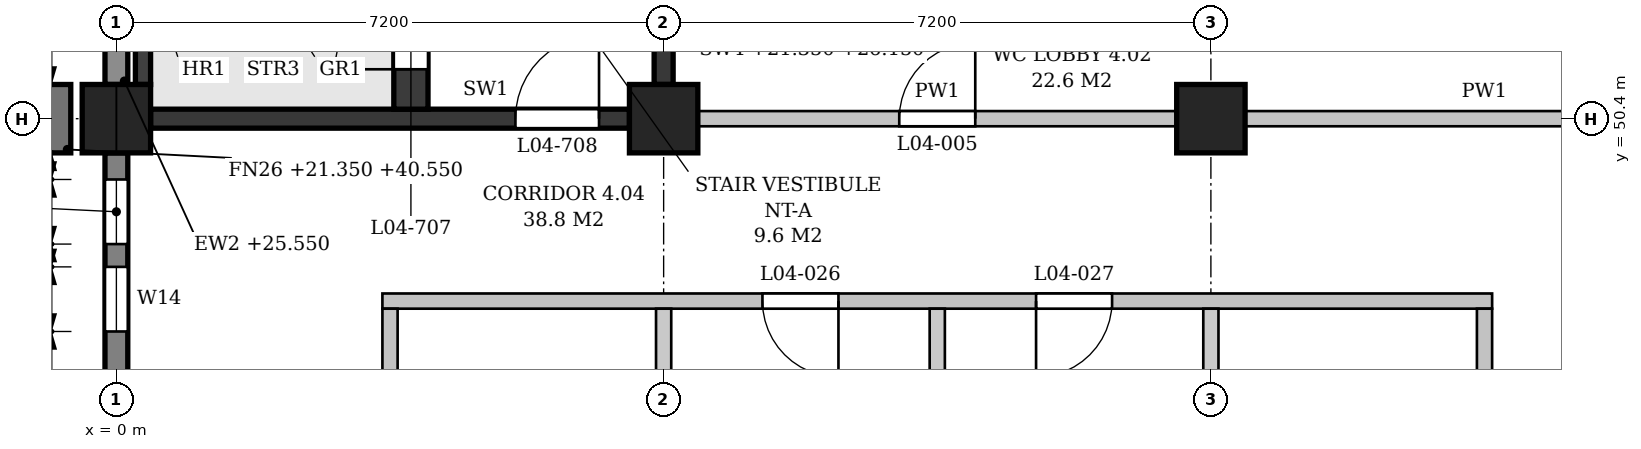
"""IFC4 building model, lengths in metres.
Left out: names, types, materials, properties, quantities, classifications, styles, units other than length and angle.
Written with IfcOpenShell. Run it as: python <this file> out.ifc"""

import sys

from ifc_helpers import new_model, si_unit, direction, frame, frame_2d, origin, origin_2d, place, context, subcontext, project, spatial, polyline, rectangle, outline, extrude, element, fill, save


model = new_model("IFC4")
c1 = context("Model", 3, precision=1e-05, world=origin(), true_north=direction((0.0, 1.0)))
c2 = subcontext(c1, "Body", "Model", "MODEL_VIEW")
j1 = project(units=[si_unit("LENGTHUNIT", "METRE"), si_unit("PLANEANGLEUNIT", "RADIAN")], contexts=[c1])
p1 = place(None, origin())
s1 = spatial("IfcSite", under=j1, at=p1, CompositionType="ELEMENT")
p2 = place(p1, origin())
s2 = spatial("IfcBuilding", under=s1, at=p2, CompositionType="ELEMENT")
p3 = place(p2, frame((0.0, 0.0, 21.6)))
s3 = spatial("IfcBuildingStorey", under=s2, at=p3, CompositionType="ELEMENT", Elevation=21.6)
for number, where, z_axis, x_axis in (
    (1, (0.0, 50.4, 0.0), (0.0, 0.0, 1.0), (1.0, 0.0, 0.0)),
    (2, (7.2, 50.4, 0.0), (0.0, 0.0, 1.0), (1.0, 0.0, 0.0)),
    (3, (14.4, 50.4, 0.0), (0.0, 0.0, 1.0), (1.0, 0.0, 0.0)),
):
    element("IfcColumn", number, at=place(p3, frame(where, z_axis=z_axis, x_axis=x_axis)), inside=s3, PredefinedType="COLUMN", context=c2, shape_type="SweptSolid", body=[
        extrude(rectangle(XDim=0.9, YDim=0.9, at=origin_2d()), origin(), (0.0, 0.0, 1.0), 4.8),
    ])
p4 = place(p3, frame((0.0, 43.65, 0.0), z_axis=(0.0, 0.0, 1.0), x_axis=(0.0, 1.0, 0.0)))
e4 = element("IfcWall", 4, at=p4, inside=s3, PredefinedType="STANDARD", context=c2, shape_type="SweptSolid", body=[
    extrude(rectangle(XDim=6.3, YDim=0.3, at=frame_2d((3.15, 0.0))), origin(), (0.0, 0.0, 1.0), 3.95),
])
p5 = place(p4, frame((0.35, 0.0, 0.9)))
e5 = element("IfcOpeningElement", 5, at=p5, cuts=e4, PredefinedType="OPENING", context=c2, shape_type="SweptSolid", body=[
    extrude(outline(polyline([(0.0, 0.0), (0.85, 0.0), (0.85, 2.05), (0.425, 2.5), (0.0, 2.05), (0.0, 0.0)])), frame((0.0, 0.16, 0.0), z_axis=(0.0, -1.0, 0.0), x_axis=(1.0, 0.0, 0.0)), (0.0, 0.0, 1.0), 0.32),
])
p6 = place(p4, frame((1.5, 0.0, 0.9)))
e6 = element("IfcOpeningElement", 6, at=p6, cuts=e4, PredefinedType="OPENING", context=c2, shape_type="SweptSolid", body=[
    extrude(outline(polyline([(0.0, 0.0), (0.85, 0.0), (0.85, 2.05), (0.425, 2.5), (0.0, 2.05), (0.0, 0.0)])), frame((0.0, 0.16, 0.0), z_axis=(0.0, -1.0, 0.0), x_axis=(1.0, 0.0, 0.0)), (0.0, 0.0, 1.0), 0.32),
])
p7 = place(p4, frame((3.95, 0.0, 0.9)))
e7 = element("IfcOpeningElement", 7, at=p7, cuts=e4, PredefinedType="OPENING", context=c2, shape_type="SweptSolid", body=[
    extrude(outline(polyline([(0.0, 0.0), (0.85, 0.0), (0.85, 2.05), (0.425, 2.5), (0.0, 2.05), (0.0, 0.0)])), frame((0.0, 0.16, 0.0), z_axis=(0.0, -1.0, 0.0), x_axis=(1.0, 0.0, 0.0)), (0.0, 0.0, 1.0), 0.32),
])
p8 = place(p4, frame((5.1, 0.0, 0.9)))
e8 = element("IfcOpeningElement", 8, at=p8, cuts=e4, PredefinedType="OPENING", context=c2, shape_type="SweptSolid", body=[
    extrude(outline(polyline([(0.0, 0.0), (0.85, 0.0), (0.85, 2.05), (0.425, 2.5), (0.0, 2.05), (0.0, 0.0)])), frame((0.0, 0.16, 0.0), z_axis=(0.0, -1.0, 0.0), x_axis=(1.0, 0.0, 0.0)), (0.0, 0.0, 1.0), 0.32),
])
p9 = place(p3, frame((0.0, 50.85, 0.0), z_axis=(0.0, 0.0, 1.0), x_axis=(0.0, 1.0, 0.0)))
e9 = element("IfcWall", 9, at=p9, inside=s3, PredefinedType="STANDARD", context=c2, shape_type="SweptSolid", body=[
    extrude(rectangle(XDim=6.3, YDim=0.3, at=frame_2d((3.15, 0.0))), origin(), (0.0, 0.0, 1.0), 3.95),
])
p10 = place(p9, frame((0.9, 0.0, 0.9)))
e10 = element("IfcOpeningElement", 10, at=p10, cuts=e9, PredefinedType="OPENING", context=c2, shape_type="SweptSolid", body=[
    extrude(outline(polyline([(0.0, 0.0), (0.9, 0.0), (0.9, 2.05), (0.45, 2.5), (0.0, 2.05), (0.0, 0.0)])), frame((0.0, 0.16, 0.0), z_axis=(0.0, -1.0, 0.0), x_axis=(1.0, 0.0, 0.0)), (0.0, 0.0, 1.0), 0.32),
])
p11 = place(p9, frame((4.5, 0.0, 0.9)))
e11 = element("IfcOpeningElement", 11, at=p11, cuts=e9, PredefinedType="OPENING", context=c2, shape_type="SweptSolid", body=[
    extrude(outline(polyline([(0.0, 0.0), (0.9, 0.0), (0.9, 2.05), (0.45, 2.5), (0.0, 2.05), (0.0, 0.0)])), frame((0.0, 0.16, 0.0), z_axis=(0.0, -1.0, 0.0), x_axis=(1.0, 0.0, 0.0)), (0.0, 0.0, 1.0), 0.32),
])
p12 = place(p3, frame((-0.6, 50.4, -0.25), z_axis=(0.0, 0.0, 1.0), x_axis=(-1.0, 0.0, 0.0)))
e12 = element("IfcWall", 12, at=p12, inside=s3, PredefinedType="POLYGONAL", context=c2, shape_type="SweptSolid", body=[
    extrude(outline(polyline([(1.3, 0.0), (1.3, 18.9), (1.1, 19.2), (0.0, 19.2), (0.0, 0.0), (1.3, 0.0)])), frame((0.0, 0.45, 0.0), z_axis=(0.0, -1.0, 0.0), x_axis=(1.0, 0.0, 0.0)), (0.0, 0.0, 1.0), 0.9),
])
p13 = place(p3, frame((0.45, 50.4, 0.0), z_axis=(0.0, 0.0, 1.0), x_axis=(1.0, 0.0, 0.0)))
e13 = element("IfcWall", 13, at=p13, inside=s3, PredefinedType="SHEAR", context=c2, shape_type="SweptSolid", body=[
    extrude(rectangle(XDim=6.3, YDim=0.25, at=frame_2d((3.15, 0.0))), origin(), (0.0, 0.0, 1.0), 3.8),
])
p14 = place(p13, frame((4.8, 0.0, 0.0)))
e14 = element("IfcOpeningElement", 14, at=p14, cuts=e13, PredefinedType="OPENING", context=c2, shape_type="SweptSolid", body=[
    extrude(rectangle(XDim=1.1, YDim=2.1, at=frame_2d((0.55, 1.05))), frame((0.0, 0.135, 0.0), z_axis=(0.0, -1.0, 0.0), x_axis=(1.0, 0.0, 0.0)), (0.0, 0.0, 1.0), 0.27),
])
p15 = place(p3, frame((7.2, 50.85, 0.0), z_axis=(0.0, 0.0, 1.0), x_axis=(0.0, 1.0, 0.0)))
e15 = element("IfcWall", 15, at=p15, inside=s3, PredefinedType="SHEAR", context=c2, shape_type="SweptSolid", body=[
    extrude(rectangle(XDim=6.3, YDim=0.25, at=frame_2d((3.15, 0.0))), origin(), (0.0, 0.0, 1.0), 3.8),
])
p16 = place(p3, frame((0.35, 50.85, -0.25), z_axis=(0.0, 0.0, 1.0), x_axis=(0.0, 1.0, 0.0)))
e16 = element("IfcWall", 16, at=p16, inside=s3, PredefinedType="SHEAR", context=c2, shape_type="SweptSolid", body=[
    extrude(rectangle(XDim=0.9, YDim=0.2, at=frame_2d((0.45, 0.0))), origin(), (0.0, 0.0, 1.0), 4.8),
])
p17 = place(p3, frame((3.875, 50.525, 0.0), z_axis=(0.0, 0.0, 1.0), x_axis=(0.0, 1.0, 0.0)))
e17 = element("IfcWall", 17, at=p17, inside=s3, PredefinedType="SHEAR", context=c2, shape_type="SweptSolid", body=[
    extrude(rectangle(XDim=6.85, YDim=0.45, at=frame_2d((3.425, 0.0))), origin(), (0.0, 0.0, 1.0), 4.55),
])
p18 = place(p17, frame((0.525, 0.0, 0.0)))
e18 = element("IfcOpeningElement", 18, at=p18, cuts=e17, PredefinedType="OPENING", context=c2, shape_type="SweptSolid", body=[
    extrude(rectangle(XDim=1.0, YDim=2.1, at=frame_2d((0.5, 1.05))), frame((0.0, 0.235, 0.0), z_axis=(0.0, -1.0, 0.0), x_axis=(1.0, 0.0, 0.0)), (0.0, 0.0, 1.0), 0.47),
])
p19 = place(p3, frame((3.5, 48.0, 0.0), z_axis=(0.0, 0.0, 1.0), x_axis=(1.0, 0.0, 0.0)))
e19 = element("IfcWall", 19, at=p19, inside=s3, PredefinedType="PARTITIONING", context=c2, shape_type="SweptSolid", body=[
    extrude(outline(polyline([(0.0, 0.0), (14.6, 0.0), (14.6, 4.55), (11.15, 4.55), (11.15, 3.8), (10.65, 3.8), (10.65, 4.55), (3.95, 4.55), (3.95, 3.8), (3.45, 3.8), (3.45, 4.55), (0.0, 4.55), (0.0, 0.0)])), frame((0.0, 0.1, 0.0), z_axis=(0.0, -1.0, 0.0), x_axis=(1.0, 0.0, 0.0)), (0.0, 0.0, 1.0), 0.2),
])
p20 = place(p19, frame((5.0, 0.0, 0.0)))
e20 = element("IfcOpeningElement", 20, at=p20, cuts=e19, PredefinedType="OPENING", context=c2, shape_type="SweptSolid", body=[
    extrude(rectangle(XDim=1.0, YDim=2.1, at=frame_2d((0.5, 1.05))), frame((0.0, 0.11, 0.0), z_axis=(0.0, -1.0, 0.0), x_axis=(1.0, 0.0, 0.0)), (0.0, 0.0, 1.0), 0.22),
])
p21 = place(p19, frame((8.6, 0.0, 0.0)))
e21 = element("IfcOpeningElement", 21, at=p21, cuts=e19, PredefinedType="OPENING", context=c2, shape_type="SweptSolid", body=[
    extrude(rectangle(XDim=1.0, YDim=2.1, at=frame_2d((0.5, 1.05))), frame((0.0, 0.11, 0.0), z_axis=(0.0, -1.0, 0.0), x_axis=(1.0, 0.0, 0.0)), (0.0, 0.0, 1.0), 0.22),
])
p22 = place(p3, frame((7.65, 50.4, 0.0), z_axis=(0.0, 0.0, 1.0), x_axis=(1.0, 0.0, 0.0)))
e22 = element("IfcWall", 22, at=p22, inside=s3, PredefinedType="PARTITIONING", context=c2, shape_type="SweptSolid", body=[
    extrude(rectangle(XDim=6.3, YDim=0.2, at=frame_2d((3.15, 0.0))), origin(), (0.0, 0.0, 1.0), 3.8),
])
p23 = place(p22, frame((2.65, 0.0, 0.0)))
e23 = element("IfcOpeningElement", 23, at=p23, cuts=e22, PredefinedType="OPENING", context=c2, shape_type="SweptSolid", body=[
    extrude(rectangle(XDim=1.0, YDim=2.1, at=frame_2d((0.5, 1.05))), frame((0.0, 0.11, 0.0), z_axis=(0.0, -1.0, 0.0), x_axis=(1.0, 0.0, 0.0)), (0.0, 0.0, 1.0), 0.22),
])
p24 = place(p3, frame((14.85, 50.4, 0.0), z_axis=(0.0, 0.0, 1.0), x_axis=(1.0, 0.0, 0.0)))
e24 = element("IfcWall", 24, at=p24, inside=s3, PredefinedType="PARTITIONING", context=c2, shape_type="SweptSolid", body=[
    extrude(rectangle(XDim=6.3, YDim=0.2, at=frame_2d((3.15, 0.0))), origin(), (0.0, 0.0, 1.0), 3.8),
])
p25 = place(p24, frame((4.225, 0.0, 0.0)))
e25 = element("IfcOpeningElement", 25, at=p25, cuts=e24, PredefinedType="OPENING", context=c2, shape_type="SweptSolid", body=[
    extrude(rectangle(XDim=1.0, YDim=2.1, at=frame_2d((0.5, 1.05))), frame((0.0, 0.11, 0.0), z_axis=(0.0, -1.0, 0.0), x_axis=(1.0, 0.0, 0.0)), (0.0, 0.0, 1.0), 0.22),
])
p26 = place(p3, frame((3.6, 38.5, 0.0), z_axis=(0.0, 0.0, 1.0), x_axis=(0.0, 1.0, 0.0)))
e26 = element("IfcWall", 26, at=p26, inside=s3, PredefinedType="PARTITIONING", context=c2, shape_type="SweptSolid", body=[
    extrude(outline(polyline([(0.0, 0.0), (9.4, 0.0), (9.4, 4.55), (4.95, 4.55), (4.95, 3.8), (4.45, 3.8), (4.45, 4.55), (0.0, 4.55), (0.0, 0.0)])), frame((0.0, 0.1, 0.0), z_axis=(0.0, -1.0, 0.0), x_axis=(1.0, 0.0, 0.0)), (0.0, 0.0, 1.0), 0.2),
])
p27 = place(p26, frame((4.2, 0.0, 0.0)))
e27 = element("IfcOpeningElement", 27, at=p27, cuts=e26, PredefinedType="OPENING", context=c2, shape_type="SweptSolid", body=[
    extrude(rectangle(XDim=1.0, YDim=2.1, at=frame_2d((0.5, 1.05))), frame((0.0, 0.11, 0.0), z_axis=(0.0, -1.0, 0.0), x_axis=(1.0, 0.0, 0.0)), (0.0, 0.0, 1.0), 0.22),
])
p28 = place(p3, frame((7.2, 43.65, 0.0), z_axis=(0.0, 0.0, 1.0), x_axis=(0.0, 1.0, 0.0)))
e28 = element("IfcWall", 28, at=p28, inside=s3, PredefinedType="PARTITIONING", context=c2, shape_type="SweptSolid", body=[
    extrude(rectangle(XDim=4.25, YDim=0.2, at=frame_2d((2.125, 0.0))), origin(), (0.0, 0.0, 1.0), 3.8),
])
p29 = place(p3, frame((10.8, 38.5, 0.0), z_axis=(0.0, 0.0, 1.0), x_axis=(0.0, 1.0, 0.0)))
e29 = element("IfcWall", 29, at=p29, inside=s3, PredefinedType="PARTITIONING", context=c2, shape_type="SweptSolid", body=[
    extrude(outline(polyline([(0.0, 0.0), (9.4, 0.0), (9.4, 4.55), (4.95, 4.55), (4.95, 3.8), (4.45, 3.8), (4.45, 4.55), (0.0, 4.55), (0.0, 0.0)])), frame((0.0, 0.1, 0.0), z_axis=(0.0, -1.0, 0.0), x_axis=(1.0, 0.0, 0.0)), (0.0, 0.0, 1.0), 0.2),
])
p30 = place(p3, frame((14.4, 43.65, 0.0), z_axis=(0.0, 0.0, 1.0), x_axis=(0.0, 1.0, 0.0)))
e30 = element("IfcWall", 30, at=p30, inside=s3, PredefinedType="PARTITIONING", context=c2, shape_type="SweptSolid", body=[
    extrude(rectangle(XDim=4.25, YDim=0.2, at=frame_2d((2.125, 0.0))), origin(), (0.0, 0.0, 1.0), 3.8),
])
p31 = place(p3, frame((18.0, 38.5, 0.0), z_axis=(0.0, 0.0, 1.0), x_axis=(0.0, 1.0, 0.0)))
e31 = element("IfcWall", 31, at=p31, inside=s3, PredefinedType="PARTITIONING", context=c2, shape_type="SweptSolid", body=[
    extrude(outline(polyline([(0.0, 0.0), (9.4, 0.0), (9.4, 4.55), (4.95, 4.55), (4.95, 3.8), (4.45, 3.8), (4.45, 4.55), (0.0, 4.55), (0.0, 0.0)])), frame((0.0, 0.1, 0.0), z_axis=(0.0, -1.0, 0.0), x_axis=(1.0, 0.0, 0.0)), (0.0, 0.0, 1.0), 0.2),
])
p32 = place(p7, origin())
e32 = element("IfcWindow", 32, at=p32, inside=s3, PartitioningType="SINGLE_PANEL", PredefinedType="WINDOW", context=c2, shape_type="SweptSolid", body=[
    extrude(outline(polyline([(0.0, 0.0), (0.85, 0.0), (0.85, 2.05), (0.425, 2.5), (0.0, 2.05), (0.0, 0.0)])), frame((0.0, 0.03, 0.0), z_axis=(0.0, -1.0, 0.0), x_axis=(1.0, 0.0, 0.0)), (0.0, 0.0, 1.0), 0.06),
])
fill(e7, e32)
p33 = place(p8, origin())
e33 = element("IfcWindow", 33, at=p33, inside=s3, PartitioningType="SINGLE_PANEL", PredefinedType="WINDOW", context=c2, shape_type="SweptSolid", body=[
    extrude(outline(polyline([(0.0, 0.0), (0.85, 0.0), (0.85, 2.05), (0.425, 2.5), (0.0, 2.05), (0.0, 0.0)])), frame((0.0, 0.03, 0.0), z_axis=(0.0, -1.0, 0.0), x_axis=(1.0, 0.0, 0.0)), (0.0, 0.0, 1.0), 0.06),
])
fill(e8, e33)
p34 = place(p18, origin())
e34 = element("IfcDoor", 34, at=p34, inside=s3, OperationType="SINGLE_SWING_LEFT", PredefinedType="DOOR", context=c2, shape_type="SweptSolid", body=[
    extrude(rectangle(XDim=1.0, YDim=2.1, at=frame_2d((0.5, 1.05))), frame((0.0, 0.025, 0.0), z_axis=(0.0, -1.0, 0.0), x_axis=(1.0, 0.0, 0.0)), (0.0, 0.0, 1.0), 0.05),
])
fill(e18, e34)
p35 = place(p14, origin())
e35 = element("IfcDoor", 35, at=p35, inside=s3, OperationType="SINGLE_SWING_RIGHT", PredefinedType="DOOR", context=c2, shape_type="SweptSolid", body=[
    extrude(rectangle(XDim=1.1, YDim=2.1, at=frame_2d((0.55, 1.05))), frame((0.0, 0.025, 0.0), z_axis=(0.0, -1.0, 0.0), x_axis=(1.0, 0.0, 0.0)), (0.0, 0.0, 1.0), 0.05),
])
fill(e14, e35)
p36 = place(p23, origin())
e36 = element("IfcDoor", 36, at=p36, inside=s3, OperationType="SINGLE_SWING_RIGHT", PredefinedType="DOOR", context=c2, shape_type="SweptSolid", body=[
    extrude(rectangle(XDim=1.0, YDim=2.1, at=frame_2d((0.5, 1.05))), frame((0.0, 0.025, 0.0), z_axis=(0.0, -1.0, 0.0), x_axis=(1.0, 0.0, 0.0)), (0.0, 0.0, 1.0), 0.05),
])
fill(e23, e36)
p37 = place(p20, frame((1.0, 0.0, 0.0), z_axis=(0.0, 0.0, 1.0), x_axis=(-1.0, 0.0, 0.0)))
e37 = element("IfcDoor", 37, at=p37, inside=s3, OperationType="SINGLE_SWING_LEFT", PredefinedType="DOOR", context=c2, shape_type="SweptSolid", body=[
    extrude(rectangle(XDim=1.0, YDim=2.1, at=frame_2d((0.5, 1.05))), frame((0.0, 0.025, 0.0), z_axis=(0.0, -1.0, 0.0), x_axis=(1.0, 0.0, 0.0)), (0.0, 0.0, 1.0), 0.05),
])
fill(e20, e37)
p38 = place(p21, frame((1.0, 0.0, 0.0), z_axis=(0.0, 0.0, 1.0), x_axis=(-1.0, 0.0, 0.0)))
e38 = element("IfcDoor", 38, at=p38, inside=s3, OperationType="SINGLE_SWING_RIGHT", PredefinedType="DOOR", context=c2, shape_type="SweptSolid", body=[
    extrude(rectangle(XDim=1.0, YDim=2.1, at=frame_2d((0.5, 1.05))), frame((0.0, 0.025, 0.0), z_axis=(0.0, -1.0, 0.0), x_axis=(1.0, 0.0, 0.0)), (0.0, 0.0, 1.0), 0.05),
])
fill(e21, e38)
save(model, sys.argv[1])
